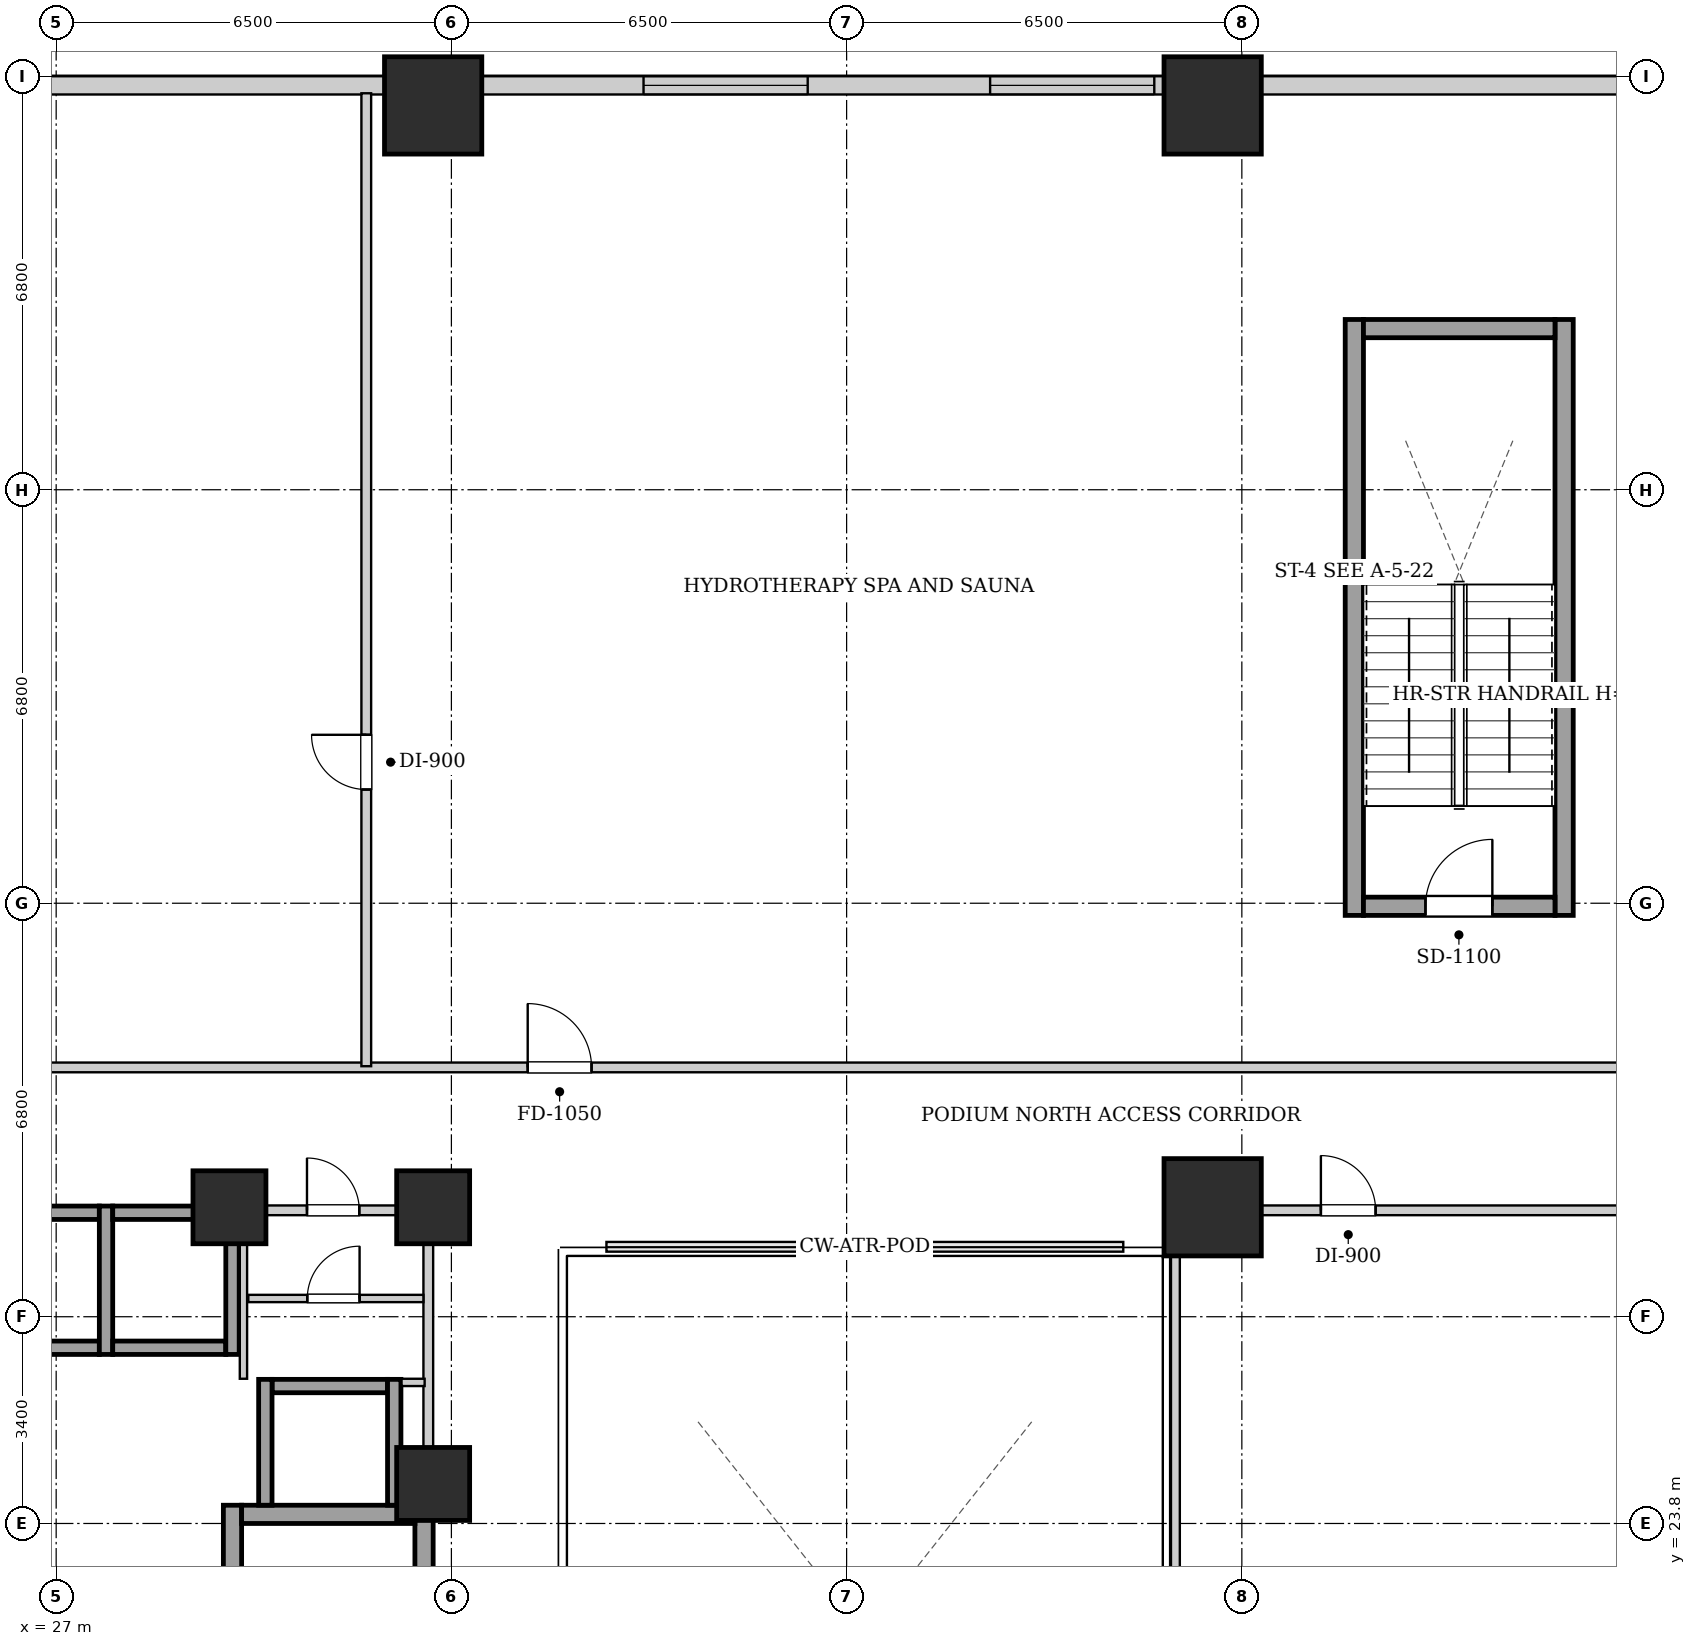
"""IFC4 building model, lengths in metres.
Left out: names, types, materials, properties, quantities, classifications, styles, units other than length and angle.
Written with IfcOpenShell. Run it as: python <this file> out.ifc"""

import sys

from ifc_helpers import new_model, si_unit, direction, frame, frame_2d, origin, origin_2d, place, context, subcontext, project, spatial, rectangle, extrude, element, fill, save


model = new_model("IFC4")
c1 = context("Model", 3, precision=1e-05, world=origin(), true_north=direction((0.0, 1.0)))
c2 = subcontext(c1, "Body", "Model", "MODEL_VIEW")
j1 = project(units=[si_unit("LENGTHUNIT", "METRE"), si_unit("PLANEANGLEUNIT", "RADIAN")], contexts=[c1])
p1 = place(None, origin())
s1 = spatial("IfcSite", under=j1, at=p1, CompositionType="ELEMENT")
p2 = place(p1, origin())
s2 = spatial("IfcBuilding", under=s1, at=p2, CompositionType="ELEMENT")
p3 = place(p2, frame((0.0, 0.0, 16.0)))
s3 = spatial("IfcBuildingStorey", under=s2, at=p3, CompositionType="ELEMENT", Elevation=16.0)
for number, where, z_axis, x_axis in (
    (1, (46.02, 29.0, 0.0), (0.0, 0.0, 1.0), (1.0, 0.0, 0.0)),
    (2, (46.02, 47.12, 0.0), (0.0, 0.0, 1.0), (1.0, 0.0, 0.0)),
    (3, (33.2, 47.12, 0.0), (0.0, 0.0, 1.0), (1.0, 0.0, 0.0)),
):
    element("IfcColumn", number, at=place(p3, frame(where, z_axis=z_axis, x_axis=x_axis)), inside=s3, PredefinedType="COLUMN", context=c2, shape_type="SweptSolid", body=[
        extrude(rectangle(XDim=1.6, YDim=1.6, at=origin_2d()), origin(), (0.0, 0.0, 1.0), 4.8),
    ])
for number, where, z_axis, x_axis in (
    (4, (29.85, 29.0, 0.0), (0.0, 0.0, 1.0), (1.0, 0.0, 0.0)),
    (5, (33.2, 29.0, 0.0), (0.0, 0.0, 1.0), (1.0, 0.0, 0.0)),
    (6, (33.2, 24.45, 0.0), (0.0, 0.0, 1.0), (1.0, 0.0, 0.0)),
):
    element("IfcColumn", number, at=place(p3, frame(where, z_axis=z_axis, x_axis=x_axis)), inside=s3, PredefinedType="COLUMN", context=c2, shape_type="SweptSolid", body=[
        extrude(rectangle(XDim=1.2, YDim=1.2, at=origin_2d()), origin(), (0.0, 0.0, 1.0), 4.8),
    ])
p4 = place(p3, frame((0.16, 47.45, 0.0), z_axis=(0.0, 0.0, 1.0), x_axis=(1.0, 0.0, 0.0)))
e7 = element("IfcWall", 7, at=p4, inside=s3, PredefinedType="SOLIDWALL", context=c2, shape_type="SweptSolid", body=[
    extrude(rectangle(XDim=53.68, YDim=0.3, at=frame_2d((26.84, 0.0))), origin(), (0.0, 0.0, 1.0), 3.235),
])
p5 = place(p4, frame((4.0, 0.0, 0.9)))
e8 = element("IfcOpeningElement", 8, at=p5, cuts=e7, PredefinedType="OPENING", context=c2, shape_type="SweptSolid", body=[
    extrude(rectangle(XDim=2.7, YDim=2.1, at=frame_2d((1.35, 1.05))), frame((0.0, 0.16, 0.0), z_axis=(0.0, -1.0, 0.0), x_axis=(1.0, 0.0, 0.0)), (0.0, 0.0, 1.0), 0.32),
])
p6 = place(p4, frame((10.5, 0.0, 0.9)))
e9 = element("IfcOpeningElement", 9, at=p6, cuts=e7, PredefinedType="OPENING", context=c2, shape_type="SweptSolid", body=[
    extrude(rectangle(XDim=2.7, YDim=2.1, at=frame_2d((1.35, 1.05))), frame((0.0, 0.16, 0.0), z_axis=(0.0, -1.0, 0.0), x_axis=(1.0, 0.0, 0.0)), (0.0, 0.0, 1.0), 0.32),
])
p7 = place(p4, frame((19.5, 0.0, 0.9)))
e10 = element("IfcOpeningElement", 10, at=p7, cuts=e7, PredefinedType="OPENING", context=c2, shape_type="SweptSolid", body=[
    extrude(rectangle(XDim=2.7, YDim=2.1, at=frame_2d((1.35, 1.05))), frame((0.0, 0.16, 0.0), z_axis=(0.0, -1.0, 0.0), x_axis=(1.0, 0.0, 0.0)), (0.0, 0.0, 1.0), 0.32),
])
p8 = place(p4, frame((36.5, 0.0, 0.9)))
e11 = element("IfcOpeningElement", 11, at=p8, cuts=e7, PredefinedType="OPENING", context=c2, shape_type="SweptSolid", body=[
    extrude(rectangle(XDim=2.7, YDim=2.1, at=frame_2d((1.35, 1.05))), frame((0.0, 0.16, 0.0), z_axis=(0.0, -1.0, 0.0), x_axis=(1.0, 0.0, 0.0)), (0.0, 0.0, 1.0), 0.32),
])
p9 = place(p4, frame((42.2, 0.0, 0.9)))
e12 = element("IfcOpeningElement", 12, at=p9, cuts=e7, PredefinedType="OPENING", context=c2, shape_type="SweptSolid", body=[
    extrude(rectangle(XDim=2.7, YDim=2.1, at=frame_2d((1.35, 1.05))), frame((0.0, 0.16, 0.0), z_axis=(0.0, -1.0, 0.0), x_axis=(1.0, 0.0, 0.0)), (0.0, 0.0, 1.0), 0.32),
])
for number, where, z_axis, x_axis in (
    (13, (29.9, 15.1, 0.0), (0.0, 0.0, 1.0), (0.0, 1.0, 0.0)),
    (14, (33.05, 15.1, 0.0), (0.0, 0.0, 1.0), (0.0, 1.0, 0.0)),
):
    element("IfcWall", number, at=place(p3, frame(where, z_axis=z_axis, x_axis=x_axis)), inside=s3, PredefinedType="SHEAR", context=c2, shape_type="SweptSolid", body=[
        extrude(rectangle(XDim=9.0, YDim=0.3, at=frame_2d((4.5, 0.0))), origin(), (0.0, 0.0, 1.0), 4.35),
    ])
p10 = place(p3, frame((30.05, 23.95, 0.0), z_axis=(0.0, 0.0, 1.0), x_axis=(1.0, 0.0, 0.0)))
e15 = element("IfcWall", 15, at=p10, inside=s3, PredefinedType="SHEAR", context=c2, shape_type="SweptSolid", body=[
    extrude(rectangle(XDim=2.85, YDim=0.3, at=frame_2d((1.425, 0.0))), origin(), (0.0, 0.0, 1.0), 4.35),
])
for number, where, z_axis, x_axis in (
    (16, (48.35, 33.8, 0.0), (0.0, 0.0, 1.0), (0.0, 1.0, 0.0)),
    (17, (51.8, 33.8, 0.0), (0.0, 0.0, 1.0), (0.0, 1.0, 0.0)),
):
    element("IfcWall", number, at=place(p3, frame(where, z_axis=z_axis, x_axis=x_axis)), inside=s3, PredefinedType="SHEAR", context=c2, shape_type="SweptSolid", body=[
        extrude(rectangle(XDim=9.8, YDim=0.3, at=frame_2d((4.9, 0.0))), origin(), (0.0, 0.0, 1.0), 4.35),
    ])
p11 = place(p3, frame((48.5, 43.45, 0.0), z_axis=(0.0, 0.0, 1.0), x_axis=(1.0, 0.0, 0.0)))
e18 = element("IfcWall", 18, at=p11, inside=s3, PredefinedType="SHEAR", context=c2, shape_type="SweptSolid", body=[
    extrude(rectangle(XDim=3.15, YDim=0.3, at=frame_2d((1.575, 0.0))), origin(), (0.0, 0.0, 1.0), 4.35),
])
p12 = place(p3, frame((48.5, 33.95, 0.0), z_axis=(0.0, 0.0, 1.0), x_axis=(1.0, 0.0, 0.0)))
e19 = element("IfcWall", 19, at=p12, inside=s3, PredefinedType="SHEAR", context=c2, shape_type="SweptSolid", body=[
    extrude(rectangle(XDim=3.15, YDim=0.3, at=frame_2d((1.575, 0.0))), origin(), (0.0, 0.0, 1.0), 4.35),
])
p13 = place(p12, frame((1.02, 0.0, 0.0)))
e20 = element("IfcOpeningElement", 20, at=p13, cuts=e19, PredefinedType="OPENING", context=c2, shape_type="SweptSolid", body=[
    extrude(rectangle(XDim=1.1, YDim=2.05, at=frame_2d((0.55, 1.025))), frame((0.0, 0.16, 0.0), z_axis=(0.0, -1.0, 0.0), x_axis=(1.0, 0.0, 0.0)), (0.0, 0.0, 1.0), 0.32),
])
for number, where, z_axis, x_axis in (
    (21, (25.85, 26.69, 0.0), (0.0, 0.0, 1.0), (1.0, 0.0, 0.0)),
    (22, (25.85, 28.91, 0.0), (0.0, 0.0, 1.0), (1.0, 0.0, 0.0)),
):
    element("IfcWall", number, at=place(p3, frame(where, z_axis=z_axis, x_axis=x_axis)), inside=s3, PredefinedType="SHEAR", context=c2, shape_type="SweptSolid", body=[
        extrude(rectangle(XDim=1.86, YDim=0.22, at=frame_2d((0.93, 0.0))), origin(), (0.0, 0.0, 1.0), 4.35),
    ])
p14 = place(p3, frame((27.82, 26.58, 0.0), z_axis=(0.0, 0.0, 1.0), x_axis=(0.0, 1.0, 0.0)))
e23 = element("IfcWall", 23, at=p14, inside=s3, PredefinedType="SHEAR", context=c2, shape_type="SweptSolid", body=[
    extrude(rectangle(XDim=2.44, YDim=0.22, at=frame_2d((1.22, 0.0))), origin(), (0.0, 0.0, 1.0), 4.35),
])
for number, where, z_axis, x_axis in (
    (24, (27.93, 26.69, 0.0), (0.0, 0.0, 1.0), (1.0, 0.0, 0.0)),
    (25, (27.93, 28.91, 0.0), (0.0, 0.0, 1.0), (1.0, 0.0, 0.0)),
):
    element("IfcWall", number, at=place(p3, frame(where, z_axis=z_axis, x_axis=x_axis)), inside=s3, PredefinedType="SHEAR", context=c2, shape_type="SweptSolid", body=[
        extrude(rectangle(XDim=1.86, YDim=0.22, at=frame_2d((0.93, 0.0))), origin(), (0.0, 0.0, 1.0), 4.35),
    ])
p15 = place(p3, frame((29.9, 26.58, 0.0), z_axis=(0.0, 0.0, 1.0), x_axis=(0.0, 1.0, 0.0)))
e26 = element("IfcWall", 26, at=p15, inside=s3, PredefinedType="SHEAR", context=c2, shape_type="SweptSolid", body=[
    extrude(rectangle(XDim=2.44, YDim=0.22, at=frame_2d((1.22, 0.0))), origin(), (0.0, 0.0, 1.0), 4.35),
])
p16 = place(p3, frame((30.55, 26.06, 0.0), z_axis=(0.0, 0.0, 1.0), x_axis=(1.0, 0.0, 0.0)))
e27 = element("IfcWall", 27, at=p16, inside=s3, PredefinedType="SHEAR", context=c2, shape_type="SweptSolid", body=[
    extrude(rectangle(XDim=1.9, YDim=0.22, at=frame_2d((0.95, 0.0))), origin(), (0.0, 0.0, 1.0), 4.35),
])
for number, where, z_axis, x_axis in (
    (28, (30.44, 24.1, 0.0), (0.0, 0.0, 1.0), (0.0, 1.0, 0.0)),
    (29, (32.56, 24.1, 0.0), (0.0, 0.0, 1.0), (0.0, 1.0, 0.0)),
):
    element("IfcWall", number, at=place(p3, frame(where, z_axis=z_axis, x_axis=x_axis)), inside=s3, PredefinedType="SHEAR", context=c2, shape_type="SweptSolid", body=[
        extrude(rectangle(XDim=2.07, YDim=0.22, at=frame_2d((1.035, 0.0))), origin(), (0.0, 0.0, 1.0), 4.35),
    ])
p17 = place(p3, frame((33.12, 24.12, 0.0), z_axis=(0.0, 0.0, 1.0), x_axis=(0.0, 1.0, 0.0)))
e30 = element("IfcWall", 30, at=p17, inside=s3, PredefinedType="PARTITIONING", context=c2, shape_type="SweptSolid", body=[
    extrude(rectangle(XDim=4.76, YDim=0.16, at=frame_2d((2.38, 0.0))), origin(), (0.0, 0.0, 1.0), 4.35),
])
p18 = place(p3, frame((30.08, 26.18, 0.0), z_axis=(0.0, 0.0, 1.0), x_axis=(0.0, 1.0, 0.0)))
e31 = element("IfcWall", 31, at=p18, inside=s3, PredefinedType="PARTITIONING", context=c2, shape_type="SweptSolid", body=[
    extrude(rectangle(XDim=2.68, YDim=0.12, at=frame_2d((1.34, 0.0))), origin(), (0.0, 0.0, 1.0), 4.35),
])
p19 = place(p3, frame((32.68, 26.12, 0.0), z_axis=(0.0, 0.0, 1.0), x_axis=(1.0, 0.0, 0.0)))
e32 = element("IfcWall", 32, at=p19, inside=s3, PredefinedType="PARTITIONING", context=c2, shape_type="SweptSolid", body=[
    extrude(rectangle(XDim=0.38, YDim=0.12, at=frame_2d((0.19, 0.0))), origin(), (0.0, 0.0, 1.0), 4.35),
])
p20 = place(p3, frame((30.16, 27.5, 0.0), z_axis=(0.0, 0.0, 1.0), x_axis=(1.0, 0.0, 0.0)))
e33 = element("IfcWall", 33, at=p20, inside=s3, PredefinedType="PARTITIONING", context=c2, shape_type="SweptSolid", body=[
    extrude(rectangle(XDim=2.88, YDim=0.12, at=frame_2d((1.44, 0.0))), origin(), (0.0, 0.0, 1.0), 4.35),
])
p21 = place(p20, frame((0.97, 0.0, 0.0)))
e34 = element("IfcOpeningElement", 34, at=p21, cuts=e33, PredefinedType="OPENING", context=c2, shape_type="SweptSolid", body=[
    extrude(rectangle(XDim=0.86, YDim=2.05, at=frame_2d((0.43, 1.025))), frame((0.0, 0.07, 0.0), z_axis=(0.0, -1.0, 0.0), x_axis=(1.0, 0.0, 0.0)), (0.0, 0.0, 1.0), 0.14),
])
p22 = place(p3, frame((30.08, 28.95, 0.0), z_axis=(0.0, 0.0, 1.0), x_axis=(1.0, 0.0, 0.0)))
e35 = element("IfcWall", 35, at=p22, inside=s3, PredefinedType="PARTITIONING", context=c2, shape_type="SweptSolid", body=[
    extrude(rectangle(XDim=2.96, YDim=0.16, at=frame_2d((1.48, 0.0))), origin(), (0.0, 0.0, 1.0), 4.35),
])
p23 = place(p22, frame((1.045, 0.0, 0.0)))
e36 = element("IfcOpeningElement", 36, at=p23, cuts=e35, PredefinedType="OPENING", context=c2, shape_type="SweptSolid", body=[
    extrude(rectangle(XDim=0.86, YDim=2.05, at=frame_2d((0.43, 1.025))), frame((0.0, 0.09, 0.0), z_axis=(0.0, -1.0, 0.0), x_axis=(1.0, 0.0, 0.0)), (0.0, 0.0, 1.0), 0.18),
])
p24 = place(p3, frame((0.28, 31.3, 0.0), z_axis=(0.0, 0.0, 1.0), x_axis=(1.0, 0.0, 0.0)))
e37 = element("IfcWall", 37, at=p24, inside=s3, PredefinedType="PARTITIONING", context=c2, shape_type="SweptSolid", body=[
    extrude(rectangle(XDim=53.44, YDim=0.16, at=frame_2d((26.72, 0.0))), origin(), (0.0, 0.0, 1.0), 4.35),
])
p25 = place(p24, frame((13.975, 0.0, 0.0)))
e38 = element("IfcOpeningElement", 38, at=p25, cuts=e37, PredefinedType="OPENING", context=c2, shape_type="SweptSolid", body=[
    extrude(rectangle(XDim=1.05, YDim=2.05, at=frame_2d((0.525, 1.025))), frame((0.0, 0.09, 0.0), z_axis=(0.0, -1.0, 0.0), x_axis=(1.0, 0.0, 0.0)), (0.0, 0.0, 1.0), 0.18),
])
p26 = place(p24, frame((34.475, 0.0, 0.0)))
e39 = element("IfcOpeningElement", 39, at=p26, cuts=e37, PredefinedType="OPENING", context=c2, shape_type="SweptSolid", body=[
    extrude(rectangle(XDim=1.05, YDim=2.05, at=frame_2d((0.525, 1.025))), frame((0.0, 0.09, 0.0), z_axis=(0.0, -1.0, 0.0), x_axis=(1.0, 0.0, 0.0)), (0.0, 0.0, 1.0), 0.18),
])
p27 = place(p3, frame((45.4, 28.95, 0.0), z_axis=(0.0, 0.0, 1.0), x_axis=(1.0, 0.0, 0.0)))
e40 = element("IfcWall", 40, at=p27, inside=s3, PredefinedType="PARTITIONING", context=c2, shape_type="SweptSolid", body=[
    extrude(rectangle(XDim=8.32, YDim=0.16, at=frame_2d((4.16, 0.0))), origin(), (0.0, 0.0, 1.0), 3.435),
])
p28 = place(p27, frame((2.4, 0.0, 0.0)))
e41 = element("IfcOpeningElement", 41, at=p28, cuts=e40, PredefinedType="OPENING", context=c2, shape_type="SweptSolid", body=[
    extrude(rectangle(XDim=0.9, YDim=2.05, at=frame_2d((0.45, 1.025))), frame((0.0, 0.09, 0.0), z_axis=(0.0, -1.0, 0.0), x_axis=(1.0, 0.0, 0.0)), (0.0, 0.0, 1.0), 0.18),
])
p29 = place(p3, frame((45.4, 15.1, 0.0), z_axis=(0.0, 0.0, 1.0), x_axis=(0.0, 1.0, 0.0)))
e42 = element("IfcWall", 42, at=p29, inside=s3, PredefinedType="PARTITIONING", context=c2, shape_type="SweptSolid", body=[
    extrude(rectangle(XDim=13.78, YDim=0.16, at=frame_2d((6.89, 0.0))), origin(), (0.0, 0.0, 1.0), 4.35),
])
p30 = place(p3, frame((32.1, 31.32, 0.0), z_axis=(0.0, 0.0, 1.0), x_axis=(0.0, 1.0, 0.0)))
e43 = element("IfcWall", 43, at=p30, inside=s3, PredefinedType="PARTITIONING", context=c2, shape_type="SweptSolid", body=[
    extrude(rectangle(XDim=16.0, YDim=0.16, at=frame_2d((8.0, 0.0))), origin(), (0.0, 0.0, 1.0), 4.35),
])
p31 = place(p30, frame((4.55, 0.0, 0.0)))
e44 = element("IfcOpeningElement", 44, at=p31, cuts=e43, PredefinedType="OPENING", context=c2, shape_type="SweptSolid", body=[
    extrude(rectangle(XDim=0.9, YDim=2.05, at=frame_2d((0.45, 1.025))), frame((0.0, 0.09, 0.0), z_axis=(0.0, -1.0, 0.0), x_axis=(1.0, 0.0, 0.0)), (0.0, 0.0, 1.0), 0.18),
])
p32 = place(p13, origin())
e45 = element("IfcDoor", 45, at=p32, inside=s3, OperationType="SINGLE_SWING_RIGHT", PredefinedType="DOOR", context=c2, shape_type="SweptSolid", body=[
    extrude(rectangle(XDim=1.1, YDim=2.05, at=frame_2d((0.55, 1.025))), frame((0.0, 0.025, 0.0), z_axis=(0.0, -1.0, 0.0), x_axis=(1.0, 0.0, 0.0)), (0.0, 0.0, 1.0), 0.05),
])
fill(e20, e45)
p33 = place(p21, origin())
e46 = element("IfcDoor", 46, at=p33, inside=s3, OperationType="SINGLE_SWING_RIGHT", PredefinedType="DOOR", context=c2, shape_type="SweptSolid", body=[
    extrude(rectangle(XDim=0.86, YDim=2.05, at=frame_2d((0.43, 1.025))), frame((0.0, 0.025, 0.0), z_axis=(0.0, -1.0, 0.0), x_axis=(1.0, 0.0, 0.0)), (0.0, 0.0, 1.0), 0.05),
])
fill(e34, e46)
p34 = place(p23, origin())
e47 = element("IfcDoor", 47, at=p34, inside=s3, OperationType="SINGLE_SWING_LEFT", PredefinedType="DOOR", context=c2, shape_type="SweptSolid", body=[
    extrude(rectangle(XDim=0.86, YDim=2.05, at=frame_2d((0.43, 1.025))), frame((0.0, 0.025, 0.0), z_axis=(0.0, -1.0, 0.0), x_axis=(1.0, 0.0, 0.0)), (0.0, 0.0, 1.0), 0.05),
])
fill(e36, e47)
p35 = place(p26, origin())
e48 = element("IfcDoor", 48, at=p35, inside=s3, OperationType="SINGLE_SWING_LEFT", PredefinedType="DOOR", context=c2, shape_type="SweptSolid", body=[
    extrude(rectangle(XDim=1.05, YDim=2.05, at=frame_2d((0.525, 1.025))), frame((0.0, 0.025, 0.0), z_axis=(0.0, -1.0, 0.0), x_axis=(1.0, 0.0, 0.0)), (0.0, 0.0, 1.0), 0.05),
])
fill(e39, e48)
p36 = place(p28, origin())
e49 = element("IfcDoor", 49, at=p36, inside=s3, OperationType="SINGLE_SWING_LEFT", PredefinedType="DOOR", context=c2, shape_type="SweptSolid", body=[
    extrude(rectangle(XDim=0.9, YDim=2.05, at=frame_2d((0.45, 1.025))), frame((0.0, 0.025, 0.0), z_axis=(0.0, -1.0, 0.0), x_axis=(1.0, 0.0, 0.0)), (0.0, 0.0, 1.0), 0.05),
])
fill(e41, e49)
p37 = place(p31, origin())
e50 = element("IfcDoor", 50, at=p37, inside=s3, OperationType="SINGLE_SWING_RIGHT", PredefinedType="DOOR", context=c2, shape_type="SweptSolid", body=[
    extrude(rectangle(XDim=0.9, YDim=2.05, at=frame_2d((0.45, 1.025))), frame((0.0, 0.025, 0.0), z_axis=(0.0, -1.0, 0.0), x_axis=(1.0, 0.0, 0.0)), (0.0, 0.0, 1.0), 0.05),
])
fill(e44, e50)
p38 = place(p8, origin())
e51 = element("IfcWindow", 51, at=p38, inside=s3, PartitioningType="TRIPLE_PANEL_VERTICAL", PredefinedType="WINDOW", context=c2, shape_type="SweptSolid", body=[
    extrude(rectangle(XDim=2.7, YDim=2.1, at=frame_2d((1.35, 1.05))), frame((0.0, 0.03, 0.0), z_axis=(0.0, -1.0, 0.0), x_axis=(1.0, 0.0, 0.0)), (0.0, 0.0, 1.0), 0.06),
])
fill(e11, e51)
p39 = place(p9, origin())
e52 = element("IfcWindow", 52, at=p39, inside=s3, PartitioningType="TRIPLE_PANEL_VERTICAL", PredefinedType="WINDOW", context=c2, shape_type="SweptSolid", body=[
    extrude(rectangle(XDim=2.7, YDim=2.1, at=frame_2d((1.35, 1.05))), frame((0.0, 0.03, 0.0), z_axis=(0.0, -1.0, 0.0), x_axis=(1.0, 0.0, 0.0)), (0.0, 0.0, 1.0), 0.06),
])
fill(e12, e52)
save(model, sys.argv[1])
